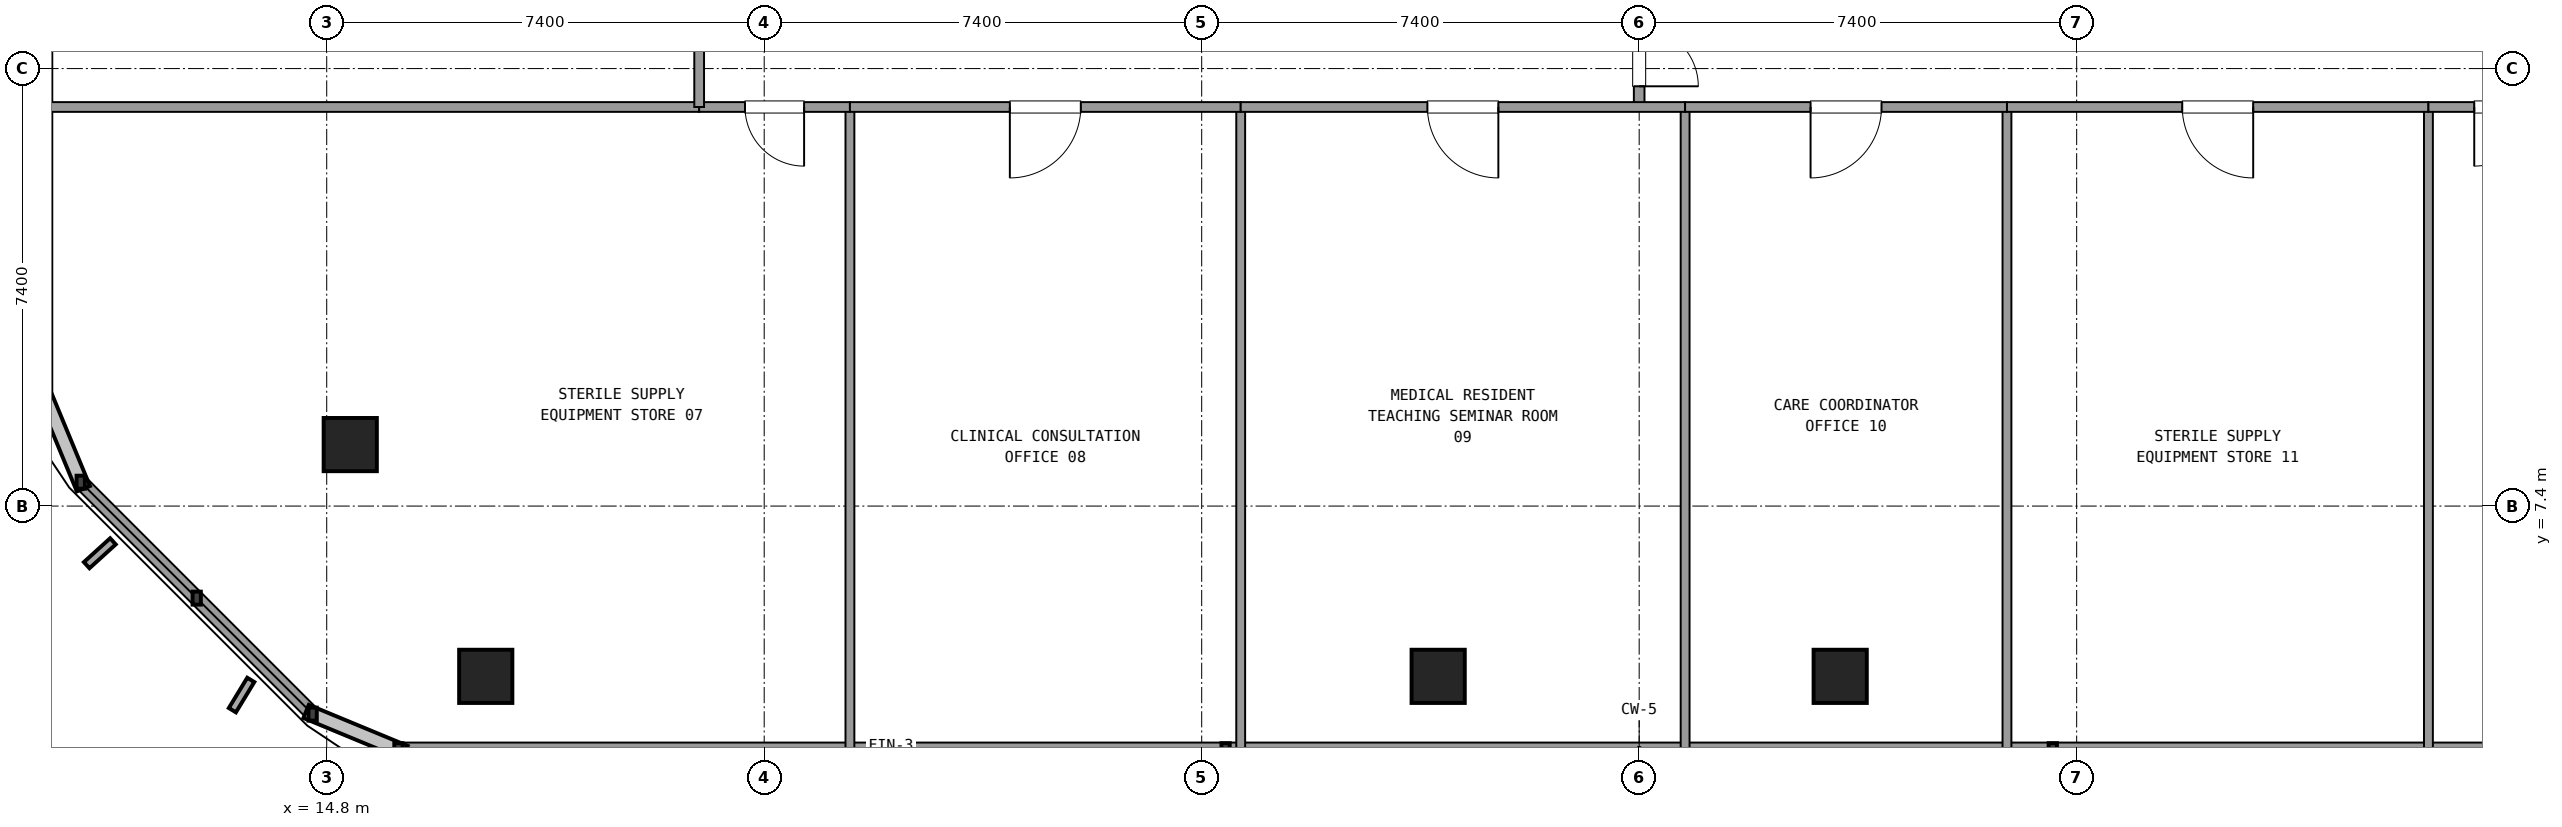
"""IFC4 building model, lengths in metres.
Left out: names, types, materials, properties, quantities, classifications, styles, units other than length and angle.
Written with IfcOpenShell. Run it as: python <this file> out.ifc"""

import sys

from ifc_helpers import new_model, si_unit, direction, frame, frame_2d, origin, origin_2d, place, context, subcontext, project, spatial, rectangle, extrude, element, fill, save


model = new_model("IFC4")
c1 = context("Model", 3, precision=1e-05, world=origin(), true_north=direction((0.0, 1.0)))
c2 = subcontext(c1, "Body", "Model", "MODEL_VIEW")
j1 = project(units=[si_unit("LENGTHUNIT", "METRE"), si_unit("PLANEANGLEUNIT", "RADIAN")], contexts=[c1])
p1 = place(None, origin())
s1 = spatial("IfcSite", under=j1, at=p1, CompositionType="ELEMENT")
p2 = place(p1, origin())
s2 = spatial("IfcBuilding", under=s1, at=p2, CompositionType="ELEMENT")
p3 = place(p2, frame((0.0, 0.0, 221.58)))
s3 = spatial("IfcBuildingStorey", under=s2, at=p3, CompositionType="ELEMENT", Elevation=221.58)
for number, where, z_axis, x_axis in (
    (1, (15.198, 8.44, 0.021), (0.0, 0.0, 1.0), (1.0, 0.0, 0.0)),
    (2, (17.49, 4.52, 0.021), (0.0, 0.0, 1.0), (1.0, 0.0, 0.0)),
    (3, (33.6, 4.52, 0.021), (0.0, 0.0, 1.0), (1.0, 0.0, 0.0)),
    (4, (40.4, 4.52, 0.021), (0.0, 0.0, 1.0), (1.0, 0.0, 0.0)),
):
    element("IfcColumn", number, at=place(p3, frame(where, z_axis=z_axis, x_axis=x_axis)), inside=s3, PredefinedType="COLUMN", context=c2, shape_type="SweptSolid", body=[
        extrude(rectangle(XDim=0.9, YDim=0.9, at=origin_2d()), origin(), (0.0, 0.0, 1.0), 3.579),
    ])
p4 = place(p3, frame((16.013, 3.28, 0.0), z_axis=(0.0, 0.0, 1.0), x_axis=(1.0, 0.0, 0.0)))
e5 = element("IfcWall", 5, at=p4, inside=s3, PredefinedType="SOLIDWALL", context=c2, shape_type="SweptSolid", body=[
    extrude(rectangle(XDim=41.974, YDim=0.24, at=frame_2d((20.987, 0.0))), origin(), (0.0, 0.0, 1.0), 0.85),
])
p5 = place(p3, frame((10.038, 24.36, 0.0), z_axis=(0.0, 0.0, 1.0), x_axis=(0.0, -1.0, 0.0)))
e6 = element("IfcWall", 6, at=p5, inside=s3, PredefinedType="SOLIDWALL", context=c2, shape_type="SweptSolid", body=[
    extrude(rectangle(XDim=15.105, YDim=0.24, at=frame_2d((7.553, 0.0))), origin(), (0.0, 0.0, 1.0), 0.85),
])
p6 = place(p3, frame((10.639, 7.804, 0.0), z_axis=(0.0, 0.0, 1.0), x_axis=(0.707128783731, -0.707084777957, 0.0)))
e7 = element("IfcWall", 7, at=p6, inside=s3, PredefinedType="SOLIDWALL", context=c2, shape_type="SweptSolid", body=[
    extrude(rectangle(XDim=5.548, YDim=0.24, at=frame_2d((2.774, 0.0))), origin(), (0.0, 0.0, 1.0), 0.85),
])
p7 = place(p3, frame((37.0, 14.15, 0.0), z_axis=(0.0, 0.0, 1.0), x_axis=(0.0, 1.0, 0.0)))
e8 = element("IfcWall", 8, at=p7, inside=s3, PredefinedType="PARTITIONING", context=c2, shape_type="SweptSolid", body=[
    extrude(rectangle(XDim=2.7, YDim=0.18, at=frame_2d((1.35, 0.0))), origin(), (0.0, 0.0, 1.0), 2.61),
])
p8 = place(p7, frame((0.35, 0.0, 0.0)))
e9 = element("IfcOpeningElement", 9, at=p8, cuts=e8, PredefinedType="OPENING", context=c2, shape_type="SweptSolid", body=[
    extrude(rectangle(XDim=2.0, YDim=2.2, at=frame_2d((1.0, 1.1))), frame((0.0, 0.1, 0.0), z_axis=(0.0, -1.0, 0.0), x_axis=(1.0, 0.0, 0.0)), (0.0, 0.0, 1.0), 0.2),
])
p9 = place(p3, frame((10.058, 14.15, 0.0), z_axis=(0.0, 0.0, 1.0), x_axis=(1.0, 0.0, 0.0)))
e10 = element("IfcWall", 10, at=p9, inside=s3, PredefinedType="PARTITIONING", context=c2, shape_type="SweptSolid", body=[
    extrude(rectangle(XDim=11.042, YDim=0.165, at=frame_2d((5.521, 0.0))), origin(), (0.0, 0.0, 1.0), 2.61),
])
p10 = place(p3, frame((23.65, 14.15, 0.0), z_axis=(0.0, 0.0, 1.0), x_axis=(0.0, -1.0, 0.0)))
e11 = element("IfcWall", 11, at=p10, inside=s3, PredefinedType="PARTITIONING", context=c2, shape_type="SweptSolid", body=[
    extrude(rectangle(XDim=10.85, YDim=0.15, at=frame_2d((5.425, 0.0))), origin(), (0.0, 0.0, 1.0), 2.61),
])
p11 = place(p3, frame((21.1, 14.15, 0.0), z_axis=(0.0, 0.0, 1.0), x_axis=(1.0, 0.0, 0.0)))
e12 = element("IfcWall", 12, at=p11, inside=s3, PredefinedType="PARTITIONING", context=c2, shape_type="SweptSolid", body=[
    extrude(rectangle(XDim=2.55, YDim=0.165, at=frame_2d((1.275, 0.0))), origin(), (0.0, 0.0, 1.0), 2.61),
])
p12 = place(p11, frame((0.775, 0.0, 0.0)))
e13 = element("IfcOpeningElement", 13, at=p12, cuts=e12, PredefinedType="OPENING", context=c2, shape_type="SweptSolid", body=[
    extrude(rectangle(XDim=1.0, YDim=2.15, at=frame_2d((0.5, 1.075))), frame((0.0, 0.093, 0.0), z_axis=(0.0, -1.0, 0.0), x_axis=(1.0, 0.0, 0.0)), (0.0, 0.0, 1.0), 0.185),
])
p13 = place(p3, frame((30.26, 14.15, 0.0), z_axis=(0.0, 0.0, 1.0), x_axis=(0.0, -1.0, 0.0)))
e14 = element("IfcWall", 14, at=p13, inside=s3, PredefinedType="PARTITIONING", context=c2, shape_type="SweptSolid", body=[
    extrude(rectangle(XDim=10.85, YDim=0.15, at=frame_2d((5.425, 0.0))), origin(), (0.0, 0.0, 1.0), 2.61),
])
p14 = place(p3, frame((23.65, 14.15, 0.0), z_axis=(0.0, 0.0, 1.0), x_axis=(1.0, 0.0, 0.0)))
e15 = element("IfcWall", 15, at=p14, inside=s3, PredefinedType="PARTITIONING", context=c2, shape_type="SweptSolid", body=[
    extrude(rectangle(XDim=6.61, YDim=0.165, at=frame_2d((3.305, 0.0))), origin(), (0.0, 0.0, 1.0), 2.61),
])
p15 = place(p14, frame((2.705, 0.0, 0.0)))
e16 = element("IfcOpeningElement", 16, at=p15, cuts=e15, PredefinedType="OPENING", context=c2, shape_type="SweptSolid", body=[
    extrude(rectangle(XDim=1.2, YDim=2.15, at=frame_2d((0.6, 1.075))), frame((0.0, 0.093, 0.0), z_axis=(0.0, -1.0, 0.0), x_axis=(1.0, 0.0, 0.0)), (0.0, 0.0, 1.0), 0.185),
])
p16 = place(p3, frame((37.777, 14.15, 0.0), z_axis=(0.0, 0.0, 1.0), x_axis=(0.0, -1.0, 0.0)))
e17 = element("IfcWall", 17, at=p16, inside=s3, PredefinedType="PARTITIONING", context=c2, shape_type="SweptSolid", body=[
    extrude(rectangle(XDim=10.85, YDim=0.15, at=frame_2d((5.425, 0.0))), origin(), (0.0, 0.0, 1.0), 2.61),
])
p17 = place(p3, frame((30.26, 14.15, 0.0), z_axis=(0.0, 0.0, 1.0), x_axis=(1.0, 0.0, 0.0)))
e18 = element("IfcWall", 18, at=p17, inside=s3, PredefinedType="PARTITIONING", context=c2, shape_type="SweptSolid", body=[
    extrude(rectangle(XDim=7.517, YDim=0.165, at=frame_2d((3.759, 0.0))), origin(), (0.0, 0.0, 1.0), 2.61),
])
p18 = place(p17, frame((3.158, 0.0, 0.0)))
e19 = element("IfcOpeningElement", 19, at=p18, cuts=e18, PredefinedType="OPENING", context=c2, shape_type="SweptSolid", body=[
    extrude(rectangle(XDim=1.2, YDim=2.15, at=frame_2d((0.6, 1.075))), frame((0.0, 0.093, 0.0), z_axis=(0.0, -1.0, 0.0), x_axis=(1.0, 0.0, 0.0)), (0.0, 0.0, 1.0), 0.185),
])
p19 = place(p3, frame((43.221, 14.15, 0.0), z_axis=(0.0, 0.0, 1.0), x_axis=(0.0, -1.0, 0.0)))
e20 = element("IfcWall", 20, at=p19, inside=s3, PredefinedType="PARTITIONING", context=c2, shape_type="SweptSolid", body=[
    extrude(rectangle(XDim=10.85, YDim=0.15, at=frame_2d((5.425, 0.0))), origin(), (0.0, 0.0, 1.0), 2.61),
])
p20 = place(p3, frame((37.777, 14.15, 0.0), z_axis=(0.0, 0.0, 1.0), x_axis=(1.0, 0.0, 0.0)))
e21 = element("IfcWall", 21, at=p20, inside=s3, PredefinedType="PARTITIONING", context=c2, shape_type="SweptSolid", body=[
    extrude(rectangle(XDim=5.444, YDim=0.165, at=frame_2d((2.722, 0.0))), origin(), (0.0, 0.0, 1.0), 2.61),
])
p21 = place(p20, frame((2.122, 0.0, 0.0)))
e22 = element("IfcOpeningElement", 22, at=p21, cuts=e21, PredefinedType="OPENING", context=c2, shape_type="SweptSolid", body=[
    extrude(rectangle(XDim=1.2, YDim=2.15, at=frame_2d((0.6, 1.075))), frame((0.0, 0.093, 0.0), z_axis=(0.0, -1.0, 0.0), x_axis=(1.0, 0.0, 0.0)), (0.0, 0.0, 1.0), 0.185),
])
p22 = place(p3, frame((50.35, 14.15, 0.0), z_axis=(0.0, 0.0, 1.0), x_axis=(0.0, -1.0, 0.0)))
e23 = element("IfcWall", 23, at=p22, inside=s3, PredefinedType="PARTITIONING", context=c2, shape_type="SweptSolid", body=[
    extrude(rectangle(XDim=10.85, YDim=0.15, at=frame_2d((5.425, 0.0))), origin(), (0.0, 0.0, 1.0), 2.61),
])
p23 = place(p3, frame((43.221, 14.15, 0.0), z_axis=(0.0, 0.0, 1.0), x_axis=(1.0, 0.0, 0.0)))
e24 = element("IfcWall", 24, at=p23, inside=s3, PredefinedType="PARTITIONING", context=c2, shape_type="SweptSolid", body=[
    extrude(rectangle(XDim=7.129, YDim=0.165, at=frame_2d((3.564, 0.0))), origin(), (0.0, 0.0, 1.0), 2.61),
])
p24 = place(p23, frame((2.965, 0.0, 0.0)))
e25 = element("IfcOpeningElement", 25, at=p24, cuts=e24, PredefinedType="OPENING", context=c2, shape_type="SweptSolid", body=[
    extrude(rectangle(XDim=1.2, YDim=2.15, at=frame_2d((0.6, 1.075))), frame((0.0, 0.093, 0.0), z_axis=(0.0, -1.0, 0.0), x_axis=(1.0, 0.0, 0.0)), (0.0, 0.0, 1.0), 0.185),
])
p25 = place(p3, frame((50.35, 14.15, 0.0), z_axis=(0.0, 0.0, 1.0), x_axis=(1.0, 0.0, 0.0)))
e26 = element("IfcWall", 26, at=p25, inside=s3, PredefinedType="PARTITIONING", context=c2, shape_type="SweptSolid", body=[
    extrude(rectangle(XDim=2.55, YDim=0.165, at=frame_2d((1.275, 0.0))), origin(), (0.0, 0.0, 1.0), 2.61),
])
p26 = place(p25, frame((0.775, 0.0, 0.0)))
e27 = element("IfcOpeningElement", 27, at=p26, cuts=e26, PredefinedType="OPENING", context=c2, shape_type="SweptSolid", body=[
    extrude(rectangle(XDim=1.0, YDim=2.15, at=frame_2d((0.5, 1.075))), frame((0.0, 0.093, 0.0), z_axis=(0.0, -1.0, 0.0), x_axis=(1.0, 0.0, 0.0)), (0.0, 0.0, 1.0), 0.185),
])
p27 = place(p3, frame((21.1, 14.15, 0.0), z_axis=(0.0, 0.0, 1.0), x_axis=(0.0, 1.0, 0.0)))
e28 = element("IfcWall", 28, at=p27, inside=s3, PredefinedType="PARTITIONING", context=c2, shape_type="SweptSolid", body=[
    extrude(rectangle(XDim=9.95, YDim=0.165, at=frame_2d((4.975, 0.0))), origin(), (0.0, 0.0, 1.0), 2.61),
])
p28 = place(p27, frame((4.375, 0.0, 0.0)))
e29 = element("IfcOpeningElement", 29, at=p28, cuts=e28, PredefinedType="OPENING", context=c2, shape_type="SweptSolid", body=[
    extrude(rectangle(XDim=1.2, YDim=2.15, at=frame_2d((0.6, 1.075))), frame((0.0, 0.093, 0.0), z_axis=(0.0, -1.0, 0.0), x_axis=(1.0, 0.0, 0.0)), (0.0, 0.0, 1.0), 0.185),
])
p29 = place(p8, frame((2.0, 0.0, 0.0), z_axis=(0.0, 0.0, 1.0), x_axis=(-1.0, 0.0, 0.0)))
e30 = element("IfcDoor", 30, at=p29, inside=s3, OperationType="DOUBLE_DOOR_SINGLE_SWING", PredefinedType="DOOR", context=c2, shape_type="SweptSolid", body=[
    extrude(rectangle(XDim=2.0, YDim=2.2, at=frame_2d((1.0, 1.1))), frame((0.0, 0.025, 0.0), z_axis=(0.0, -1.0, 0.0), x_axis=(1.0, 0.0, 0.0)), (0.0, 0.0, 1.0), 0.05),
])
fill(e9, e30)
p30 = place(p12, frame((1.0, 0.0, 0.0), z_axis=(0.0, 0.0, 1.0), x_axis=(-1.0, 0.0, 0.0)))
e31 = element("IfcDoor", 31, at=p30, inside=s3, OperationType="SINGLE_SWING_RIGHT", PredefinedType="DOOR", context=c2, shape_type="SweptSolid", body=[
    extrude(rectangle(XDim=1.0, YDim=2.15, at=frame_2d((0.5, 1.075))), frame((0.0, 0.025, 0.0), z_axis=(0.0, -1.0, 0.0), x_axis=(1.0, 0.0, 0.0)), (0.0, 0.0, 1.0), 0.05),
])
fill(e13, e31)
p31 = place(p15, frame((1.2, 0.0, 0.0), z_axis=(0.0, 0.0, 1.0), x_axis=(-1.0, 0.0, 0.0)))
e32 = element("IfcDoor", 32, at=p31, inside=s3, OperationType="SINGLE_SWING_LEFT", PredefinedType="DOOR", context=c2, shape_type="SweptSolid", body=[
    extrude(rectangle(XDim=1.2, YDim=2.15, at=frame_2d((0.6, 1.075))), frame((0.0, 0.025, 0.0), z_axis=(0.0, -1.0, 0.0), x_axis=(1.0, 0.0, 0.0)), (0.0, 0.0, 1.0), 0.05),
])
fill(e16, e32)
p32 = place(p18, frame((1.2, 0.0, 0.0), z_axis=(0.0, 0.0, 1.0), x_axis=(-1.0, 0.0, 0.0)))
e33 = element("IfcDoor", 33, at=p32, inside=s3, OperationType="SINGLE_SWING_RIGHT", PredefinedType="DOOR", context=c2, shape_type="SweptSolid", body=[
    extrude(rectangle(XDim=1.2, YDim=2.15, at=frame_2d((0.6, 1.075))), frame((0.0, 0.025, 0.0), z_axis=(0.0, -1.0, 0.0), x_axis=(1.0, 0.0, 0.0)), (0.0, 0.0, 1.0), 0.05),
])
fill(e19, e33)
p33 = place(p21, frame((1.2, 0.0, 0.0), z_axis=(0.0, 0.0, 1.0), x_axis=(-1.0, 0.0, 0.0)))
e34 = element("IfcDoor", 34, at=p33, inside=s3, OperationType="SINGLE_SWING_LEFT", PredefinedType="DOOR", context=c2, shape_type="SweptSolid", body=[
    extrude(rectangle(XDim=1.2, YDim=2.15, at=frame_2d((0.6, 1.075))), frame((0.0, 0.025, 0.0), z_axis=(0.0, -1.0, 0.0), x_axis=(1.0, 0.0, 0.0)), (0.0, 0.0, 1.0), 0.05),
])
fill(e22, e34)
p34 = place(p24, frame((1.2, 0.0, 0.0), z_axis=(0.0, 0.0, 1.0), x_axis=(-1.0, 0.0, 0.0)))
e35 = element("IfcDoor", 35, at=p34, inside=s3, OperationType="SINGLE_SWING_RIGHT", PredefinedType="DOOR", context=c2, shape_type="SweptSolid", body=[
    extrude(rectangle(XDim=1.2, YDim=2.15, at=frame_2d((0.6, 1.075))), frame((0.0, 0.025, 0.0), z_axis=(0.0, -1.0, 0.0), x_axis=(1.0, 0.0, 0.0)), (0.0, 0.0, 1.0), 0.05),
])
fill(e25, e35)
p35 = place(p26, frame((1.0, 0.0, 0.0), z_axis=(0.0, 0.0, 1.0), x_axis=(-1.0, 0.0, 0.0)))
e36 = element("IfcDoor", 36, at=p35, inside=s3, OperationType="SINGLE_SWING_LEFT", PredefinedType="DOOR", context=c2, shape_type="SweptSolid", body=[
    extrude(rectangle(XDim=1.0, YDim=2.15, at=frame_2d((0.5, 1.075))), frame((0.0, 0.025, 0.0), z_axis=(0.0, -1.0, 0.0), x_axis=(1.0, 0.0, 0.0)), (0.0, 0.0, 1.0), 0.05),
])
fill(e27, e36)
save(model, sys.argv[1])
